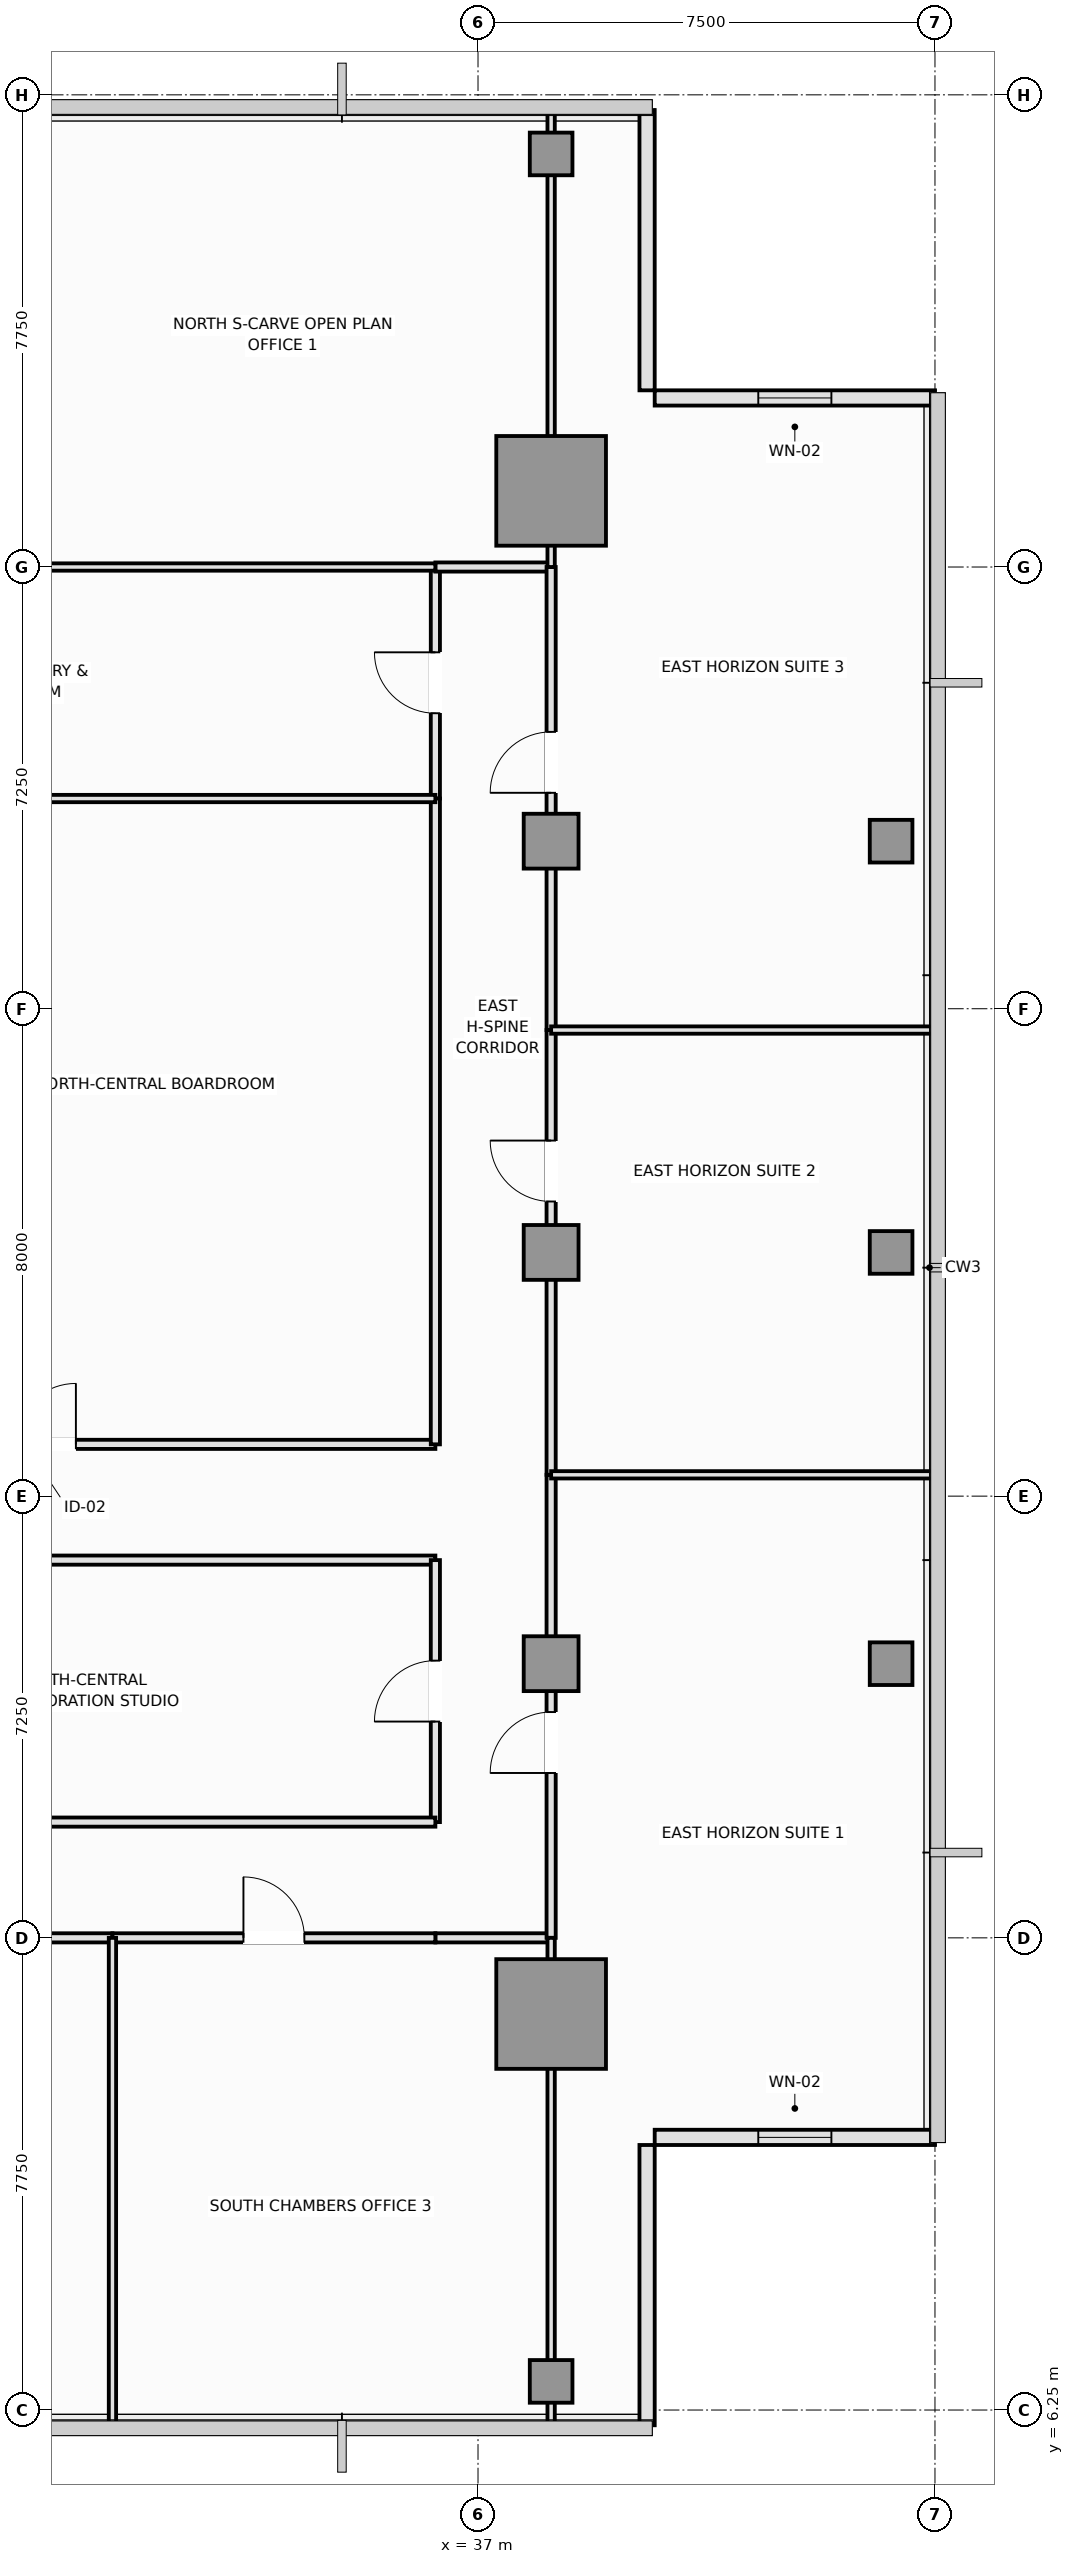
"""IFC4 building model, lengths in metres.
Left out: names, types, materials, properties, quantities, classifications, styles, units other than length and angle.
Written with IfcOpenShell. Run it as: python <this file> out.ifc"""

import sys

from ifc_helpers import new_model, si_unit, direction, frame, frame_2d, origin, origin_2d, place, context, subcontext, project, spatial, rectangle, extrude, element, fill, save


model = new_model("IFC4")
c1 = context("Model", 3, precision=1e-05, world=origin(), true_north=direction((0.0, 1.0)))
c2 = subcontext(c1, "Body", "Model", "MODEL_VIEW")
j1 = project(units=[si_unit("LENGTHUNIT", "METRE"), si_unit("PLANEANGLEUNIT", "RADIAN")], contexts=[c1])
p1 = place(None, origin())
s1 = spatial("IfcSite", under=j1, at=p1, CompositionType="ELEMENT")
p2 = place(p1, origin())
s2 = spatial("IfcBuilding", under=s1, at=p2, CompositionType="ELEMENT")
p3 = place(p2, frame((0.0, 0.0, 270.55)))
s3 = spatial("IfcBuildingStorey", under=s2, at=p3, CompositionType="ELEMENT", Elevation=270.55)
for number, where, z_axis, x_axis in (
    (1, (38.2, 12.75, 0.0), (0.0, 0.0, 1.0), (1.0, 0.0, 0.0)),
    (2, (38.2, 37.75, 0.0), (0.0, 0.0, 1.0), (1.0, 0.0, 0.0)),
):
    element("IfcColumn", number, at=place(p3, frame(where, z_axis=z_axis, x_axis=x_axis)), inside=s3, PredefinedType="COLUMN", context=c2, shape_type="SweptSolid", body=[
        extrude(rectangle(XDim=1.8, YDim=1.8, at=origin_2d()), origin(), (0.0, 0.0, 1.0), 3.55),
    ])
for number, where, z_axis, x_axis in (
    (3, (38.2, 18.5, 0.0), (0.0, 0.0, 1.0), (1.0, 0.0, 0.0)),
    (4, (38.2, 25.25, 0.0), (0.0, 0.0, 1.0), (1.0, 0.0, 0.0)),
    (5, (38.2, 32.0, 0.0), (0.0, 0.0, 1.0), (1.0, 0.0, 0.0)),
):
    element("IfcColumn", number, at=place(p3, frame(where, z_axis=z_axis, x_axis=x_axis)), inside=s3, PredefinedType="COLUMN", context=c2, shape_type="SweptSolid", body=[
        extrude(rectangle(XDim=0.9, YDim=0.9, at=origin_2d()), origin(), (0.0, 0.0, 1.0), 3.55),
    ])
for number, where, z_axis, x_axis in (
    (6, (43.78, 18.5, 0.0), (0.0, 0.0, 1.0), (1.0, 0.0, 0.0)),
    (7, (43.78, 25.25, 0.0), (0.0, 0.0, 1.0), (1.0, 0.0, 0.0)),
    (8, (43.78, 32.0, 0.0), (0.0, 0.0, 1.0), (1.0, 0.0, 0.0)),
    (9, (38.2, 6.72, 0.0), (0.0, 0.0, 1.0), (1.0, 0.0, 0.0)),
    (10, (38.2, 43.28, 0.0), (0.0, 0.0, 1.0), (1.0, 0.0, 0.0)),
):
    element("IfcColumn", number, at=place(p3, frame(where, z_axis=z_axis, x_axis=x_axis)), inside=s3, PredefinedType="COLUMN", context=c2, shape_type="SweptSolid", body=[
        extrude(rectangle(XDim=0.7, YDim=0.7, at=origin_2d()), origin(), (0.0, 0.0, 1.0), 3.55),
    ])
p4 = place(p3, frame((39.775, 6.0, 0.0), z_axis=(0.0, 0.0, 1.0), x_axis=(0.0, 1.0, 0.0)))
e11 = element("IfcWall", 11, at=p4, inside=s3, PredefinedType="SOLIDWALL", context=c2, shape_type="SweptSolid", body=[
    extrude(rectangle(XDim=4.6, YDim=0.25, at=frame_2d((2.3, 0.0))), origin(), (0.0, 0.0, 1.0), 3.39),
])
p5 = place(p3, frame((39.9, 10.725, 0.0), z_axis=(0.0, 0.0, 1.0), x_axis=(1.0, 0.0, 0.0)))
e12 = element("IfcWall", 12, at=p5, inside=s3, PredefinedType="SOLIDWALL", context=c2, shape_type="SweptSolid", body=[
    extrude(rectangle(XDim=4.6, YDim=0.25, at=frame_2d((2.3, 0.0))), origin(), (0.0, 0.0, 1.0), 3.39),
])
p6 = place(p5, frame((1.7, 0.0, 0.9)))
e13 = element("IfcOpeningElement", 13, at=p6, cuts=e12, PredefinedType="OPENING", context=c2, shape_type="SweptSolid", body=[
    extrude(rectangle(XDim=1.2, YDim=1.8, at=frame_2d((0.6, 0.9))), frame((0.0, 0.135, 0.0), z_axis=(0.0, -1.0, 0.0), x_axis=(1.0, 0.0, 0.0)), (0.0, 0.0, 1.0), 0.27),
])
p7 = place(p3, frame((44.5, 39.275, 0.0), z_axis=(0.0, 0.0, 1.0), x_axis=(-1.0, 0.0, 0.0)))
e14 = element("IfcWall", 14, at=p7, inside=s3, PredefinedType="SOLIDWALL", context=c2, shape_type="SweptSolid", body=[
    extrude(rectangle(XDim=4.6, YDim=0.25, at=frame_2d((2.3, 0.0))), origin(), (0.0, 0.0, 1.0), 3.39),
])
p8 = place(p7, frame((1.7, 0.0, 0.9)))
e15 = element("IfcOpeningElement", 15, at=p8, cuts=e14, PredefinedType="OPENING", context=c2, shape_type="SweptSolid", body=[
    extrude(rectangle(XDim=1.2, YDim=1.8, at=frame_2d((0.6, 0.9))), frame((0.0, 0.135, 0.0), z_axis=(0.0, -1.0, 0.0), x_axis=(1.0, 0.0, 0.0)), (0.0, 0.0, 1.0), 0.27),
])
p9 = place(p3, frame((39.775, 39.4, 0.0), z_axis=(0.0, 0.0, 1.0), x_axis=(0.0, 1.0, 0.0)))
e16 = element("IfcWall", 16, at=p9, inside=s3, PredefinedType="SOLIDWALL", context=c2, shape_type="SweptSolid", body=[
    extrude(rectangle(XDim=4.6, YDim=0.25, at=frame_2d((2.3, 0.0))), origin(), (0.0, 0.0, 1.0), 3.39),
])
p10 = place(p3, frame((26.13, 20.2, 0.0), z_axis=(0.0, 0.0, 1.0), x_axis=(1.0, 0.0, 0.0)))
e17 = element("IfcWall", 17, at=p10, inside=s3, PredefinedType="PARTITIONING", context=c2, shape_type="SweptSolid", body=[
    extrude(rectangle(XDim=10.17, YDim=0.15, at=frame_2d((5.085, 0.0))), origin(), (0.0, 0.0, 1.0), 3.39),
])
p11 = place(p3, frame((23.5, 22.1, 0.0), z_axis=(0.0, 0.0, 1.0), x_axis=(1.0, 0.0, 0.0)))
e18 = element("IfcWall", 18, at=p11, inside=s3, PredefinedType="PARTITIONING", context=c2, shape_type="SweptSolid", body=[
    extrude(rectangle(XDim=12.8, YDim=0.15, at=frame_2d((6.4, 0.0))), origin(), (0.0, 0.0, 1.0), 3.39),
])
p12 = place(p11, frame((5.9, 0.0, 0.0)))
e19 = element("IfcOpeningElement", 19, at=p12, cuts=e18, PredefinedType="OPENING", context=c2, shape_type="SweptSolid", body=[
    extrude(rectangle(XDim=1.0, YDim=2.15, at=frame_2d((0.5, 1.075))), frame((0.0, 0.085, 0.0), z_axis=(0.0, -1.0, 0.0), x_axis=(1.0, 0.0, 0.0)), (0.0, 0.0, 1.0), 0.17),
])
p13 = place(p3, frame((36.3, 15.9, 0.0), z_axis=(0.0, 0.0, 1.0), x_axis=(0.0, 1.0, 0.0)))
e20 = element("IfcWall", 20, at=p13, inside=s3, PredefinedType="PARTITIONING", context=c2, shape_type="SweptSolid", body=[
    extrude(rectangle(XDim=4.3, YDim=0.15, at=frame_2d((2.15, 0.0))), origin(), (0.0, 0.0, 1.0), 3.39),
])
p14 = place(p13, frame((1.65, 0.0, 0.0)))
e21 = element("IfcOpeningElement", 21, at=p14, cuts=e20, PredefinedType="OPENING", context=c2, shape_type="SweptSolid", body=[
    extrude(rectangle(XDim=1.0, YDim=2.15, at=frame_2d((0.5, 1.075))), frame((0.0, 0.085, 0.0), z_axis=(0.0, -1.0, 0.0), x_axis=(1.0, 0.0, 0.0)), (0.0, 0.0, 1.0), 0.17),
])
p15 = place(p3, frame((36.3, 32.7, 0.0), z_axis=(0.0, 0.0, 1.0), x_axis=(0.0, 1.0, 0.0)))
e22 = element("IfcWall", 22, at=p15, inside=s3, PredefinedType="PARTITIONING", context=c2, shape_type="SweptSolid", body=[
    extrude(rectangle(XDim=3.8, YDim=0.15, at=frame_2d((1.9, 0.0))), origin(), (0.0, 0.0, 1.0), 3.39),
])
p16 = place(p15, frame((1.4, 0.0, 0.0)))
e23 = element("IfcOpeningElement", 23, at=p16, cuts=e22, PredefinedType="OPENING", context=c2, shape_type="SweptSolid", body=[
    extrude(rectangle(XDim=1.0, YDim=2.15, at=frame_2d((0.5, 1.075))), frame((0.0, 0.085, 0.0), z_axis=(0.0, -1.0, 0.0), x_axis=(1.0, 0.0, 0.0)), (0.0, 0.0, 1.0), 0.17),
])
p17 = place(p3, frame((36.3, 22.1, 0.0), z_axis=(0.0, 0.0, 1.0), x_axis=(0.0, 1.0, 0.0)))
e24 = element("IfcWall", 24, at=p17, inside=s3, PredefinedType="PARTITIONING", context=c2, shape_type="SweptSolid", body=[
    extrude(rectangle(XDim=10.6, YDim=0.15, at=frame_2d((5.3, 0.0))), origin(), (0.0, 0.0, 1.0), 3.39),
])
for number, where, z_axis, x_axis in (
    (25, (36.3, 14.0, 0.0), (0.0, 0.0, 1.0), (1.0, 0.0, 0.0)),
    (26, (36.3, 36.5, 0.0), (0.0, 0.0, 1.0), (1.0, 0.0, 0.0)),
):
    element("IfcWall", number, at=place(p3, frame(where, z_axis=z_axis, x_axis=x_axis)), inside=s3, PredefinedType="PARTITIONING", context=c2, shape_type="SweptSolid", body=[
        extrude(rectangle(XDim=1.9, YDim=0.15, at=frame_2d((0.95, 0.0))), origin(), (0.0, 0.0, 1.0), 3.39),
    ])
p18 = place(p3, frame((38.2, 14.0, 0.0), z_axis=(0.0, 0.0, 1.0), x_axis=(0.0, 1.0, 0.0)))
e27 = element("IfcWall", 27, at=p18, inside=s3, PredefinedType="PARTITIONING", context=c2, shape_type="SweptSolid", body=[
    extrude(rectangle(XDim=7.6, YDim=0.15, at=frame_2d((3.8, 0.0))), origin(), (0.0, 0.0, 1.0), 2.99),
])
p19 = place(p18, frame((2.706, 0.0, 0.0)))
e28 = element("IfcOpeningElement", 28, at=p19, cuts=e27, PredefinedType="OPENING", context=c2, shape_type="SweptSolid", body=[
    extrude(rectangle(XDim=1.0, YDim=2.15, at=frame_2d((0.5, 1.075))), frame((0.0, 0.085, 0.0), z_axis=(0.0, -1.0, 0.0), x_axis=(1.0, 0.0, 0.0)), (0.0, 0.0, 1.0), 0.17),
])
p20 = place(p3, frame((38.2, 21.6, 0.0), z_axis=(0.0, 0.0, 1.0), x_axis=(0.0, 1.0, 0.0)))
e29 = element("IfcWall", 29, at=p20, inside=s3, PredefinedType="PARTITIONING", context=c2, shape_type="SweptSolid", body=[
    extrude(rectangle(XDim=7.3, YDim=0.15, at=frame_2d((3.65, 0.0))), origin(), (0.0, 0.0, 1.0), 2.99),
])
p21 = place(p20, frame((4.486, 0.0, 0.0)))
e30 = element("IfcOpeningElement", 30, at=p21, cuts=e29, PredefinedType="OPENING", context=c2, shape_type="SweptSolid", body=[
    extrude(rectangle(XDim=1.0, YDim=2.15, at=frame_2d((0.5, 1.075))), frame((0.0, 0.085, 0.0), z_axis=(0.0, -1.0, 0.0), x_axis=(1.0, 0.0, 0.0)), (0.0, 0.0, 1.0), 0.17),
])
p22 = place(p3, frame((38.2, 28.9, 0.0), z_axis=(0.0, 0.0, 1.0), x_axis=(0.0, 1.0, 0.0)))
e31 = element("IfcWall", 31, at=p22, inside=s3, PredefinedType="PARTITIONING", context=c2, shape_type="SweptSolid", body=[
    extrude(rectangle(XDim=7.6, YDim=0.15, at=frame_2d((3.8, 0.0))), origin(), (0.0, 0.0, 1.0), 2.99),
])
p23 = place(p22, frame((3.894, 0.0, 0.0)))
e32 = element("IfcOpeningElement", 32, at=p23, cuts=e31, PredefinedType="OPENING", context=c2, shape_type="SweptSolid", body=[
    extrude(rectangle(XDim=1.0, YDim=2.15, at=frame_2d((0.5, 1.075))), frame((0.0, 0.085, 0.0), z_axis=(0.0, -1.0, 0.0), x_axis=(1.0, 0.0, 0.0)), (0.0, 0.0, 1.0), 0.17),
])
p24 = place(p3, frame((26.13, 15.9, 0.0), z_axis=(0.0, 0.0, 1.0), x_axis=(1.0, 0.0, 0.0)))
e33 = element("IfcWall", 33, at=p24, inside=s3, PredefinedType="PARTITIONING", context=c2, shape_type="SweptSolid", body=[
    extrude(rectangle(XDim=10.17, YDim=0.15, at=frame_2d((5.085, 0.0))), origin(), (0.0, 0.0, 1.0), 3.39),
])
p25 = place(p3, frame((27.5, 14.0, 0.0), z_axis=(0.0, 0.0, 1.0), x_axis=(1.0, 0.0, 0.0)))
e34 = element("IfcWall", 34, at=p25, inside=s3, PredefinedType="PARTITIONING", context=c2, shape_type="SweptSolid", body=[
    extrude(rectangle(XDim=3.5, YDim=0.15, at=frame_2d((1.75, 0.0))), origin(), (0.0, 0.0, 1.0), 3.39),
])
p26 = place(p25, frame((1.25, 0.0, 0.0)))
e35 = element("IfcOpeningElement", 35, at=p26, cuts=e34, PredefinedType="OPENING", context=c2, shape_type="SweptSolid", body=[
    extrude(rectangle(XDim=1.0, YDim=2.15, at=frame_2d((0.5, 1.075))), frame((0.0, 0.085, 0.0), z_axis=(0.0, -1.0, 0.0), x_axis=(1.0, 0.0, 0.0)), (0.0, 0.0, 1.0), 0.17),
])
p27 = place(p3, frame((31.0, 14.0, 0.0), z_axis=(0.0, 0.0, 1.0), x_axis=(1.0, 0.0, 0.0)))
e36 = element("IfcWall", 36, at=p27, inside=s3, PredefinedType="PARTITIONING", context=c2, shape_type="SweptSolid", body=[
    extrude(rectangle(XDim=5.3, YDim=0.15, at=frame_2d((2.65, 0.0))), origin(), (0.0, 0.0, 1.0), 3.39),
])
p28 = place(p27, frame((2.15, 0.0, 0.0)))
e37 = element("IfcOpeningElement", 37, at=p28, cuts=e36, PredefinedType="OPENING", context=c2, shape_type="SweptSolid", body=[
    extrude(rectangle(XDim=1.0, YDim=2.15, at=frame_2d((0.5, 1.075))), frame((0.0, 0.085, 0.0), z_axis=(0.0, -1.0, 0.0), x_axis=(1.0, 0.0, 0.0)), (0.0, 0.0, 1.0), 0.17),
])
for number, where, z_axis, x_axis in (
    (38, (23.5, 32.7, 0.0), (0.0, 0.0, 1.0), (1.0, 0.0, 0.0)),
    (39, (23.5, 36.5, 0.0), (0.0, 0.0, 1.0), (1.0, 0.0, 0.0)),
):
    element("IfcWall", number, at=place(p3, frame(where, z_axis=z_axis, x_axis=x_axis)), inside=s3, PredefinedType="PARTITIONING", context=c2, shape_type="SweptSolid", body=[
        extrude(rectangle(XDim=12.8, YDim=0.12, at=frame_2d((6.4, 0.0))), origin(), (0.0, 0.0, 1.0), 3.39),
    ])
p29 = place(p3, frame((31.0, 6.01, 0.0), z_axis=(0.0, 0.0, 1.0), x_axis=(0.0, 1.0, 0.0)))
e40 = element("IfcWall", 40, at=p29, inside=s3, PredefinedType="PARTITIONING", context=c2, shape_type="SweptSolid", body=[
    extrude(rectangle(XDim=7.99, YDim=0.12, at=frame_2d((3.995, 0.0))), origin(), (0.0, 0.0, 1.0), 3.39),
])
p30 = place(p3, frame((38.2, 6.01, 0.0), z_axis=(0.0, 0.0, 1.0), x_axis=(0.0, 1.0, 0.0)))
e41 = element("IfcWall", 41, at=p30, inside=s3, PredefinedType="PARTITIONING", context=c2, shape_type="SweptSolid", body=[
    extrude(rectangle(XDim=7.99, YDim=0.12, at=frame_2d((3.995, 0.0))), origin(), (0.0, 0.0, 1.0), 2.99),
])
p31 = place(p3, frame((38.2, 36.5, 0.0), z_axis=(0.0, 0.0, 1.0), x_axis=(0.0, 1.0, 0.0)))
e42 = element("IfcWall", 42, at=p31, inside=s3, PredefinedType="PARTITIONING", context=c2, shape_type="SweptSolid", body=[
    extrude(rectangle(XDim=7.49, YDim=0.12, at=frame_2d((3.745, 0.0))), origin(), (0.0, 0.0, 1.0), 2.99),
])
for number, where, z_axis, x_axis in (
    (43, (38.2, 21.6, 0.0), (0.0, 0.0, 1.0), (1.0, 0.0, 0.0)),
    (44, (38.2, 28.9, 0.0), (0.0, 0.0, 1.0), (1.0, 0.0, 0.0)),
):
    element("IfcWall", number, at=place(p3, frame(where, z_axis=z_axis, x_axis=x_axis)), inside=s3, PredefinedType="PARTITIONING", context=c2, shape_type="SweptSolid", body=[
        extrude(rectangle(XDim=6.29, YDim=0.12, at=frame_2d((3.145, 0.0))), origin(), (0.0, 0.0, 1.0), 3.39),
    ])
p32 = place(p6, origin())
e45 = element("IfcWindow", 45, at=p32, inside=s3, PartitioningType="SINGLE_PANEL", PredefinedType="WINDOW", context=c2, shape_type="SweptSolid", body=[
    extrude(rectangle(XDim=1.2, YDim=1.8, at=frame_2d((0.6, 0.9))), frame((0.0, 0.03, 0.0), z_axis=(0.0, -1.0, 0.0), x_axis=(1.0, 0.0, 0.0)), (0.0, 0.0, 1.0), 0.06),
])
fill(e13, e45)
p33 = place(p8, origin())
e46 = element("IfcWindow", 46, at=p33, inside=s3, PartitioningType="SINGLE_PANEL", PredefinedType="WINDOW", context=c2, shape_type="SweptSolid", body=[
    extrude(rectangle(XDim=1.2, YDim=1.8, at=frame_2d((0.6, 0.9))), frame((0.0, 0.03, 0.0), z_axis=(0.0, -1.0, 0.0), x_axis=(1.0, 0.0, 0.0)), (0.0, 0.0, 1.0), 0.06),
])
fill(e15, e46)
p34 = place(p12, origin())
e47 = element("IfcDoor", 47, at=p34, inside=s3, OperationType="SINGLE_SWING_RIGHT", PredefinedType="DOOR", context=c2, shape_type="SweptSolid", body=[
    extrude(rectangle(XDim=1.0, YDim=2.15, at=frame_2d((0.5, 1.075))), frame((0.0, 0.025, 0.0), z_axis=(0.0, -1.0, 0.0), x_axis=(1.0, 0.0, 0.0)), (0.0, 0.0, 1.0), 0.05),
])
fill(e19, e47)
p35 = place(p14, origin())
e48 = element("IfcDoor", 48, at=p35, inside=s3, OperationType="SINGLE_SWING_LEFT", PredefinedType="DOOR", context=c2, shape_type="SweptSolid", body=[
    extrude(rectangle(XDim=1.0, YDim=2.15, at=frame_2d((0.5, 1.075))), frame((0.0, 0.025, 0.0), z_axis=(0.0, -1.0, 0.0), x_axis=(1.0, 0.0, 0.0)), (0.0, 0.0, 1.0), 0.05),
])
fill(e21, e48)
p36 = place(p16, origin())
e49 = element("IfcDoor", 49, at=p36, inside=s3, OperationType="SINGLE_SWING_RIGHT", PredefinedType="DOOR", context=c2, shape_type="SweptSolid", body=[
    extrude(rectangle(XDim=1.0, YDim=2.15, at=frame_2d((0.5, 1.075))), frame((0.0, 0.025, 0.0), z_axis=(0.0, -1.0, 0.0), x_axis=(1.0, 0.0, 0.0)), (0.0, 0.0, 1.0), 0.05),
])
fill(e23, e49)
p37 = place(p19, origin())
e50 = element("IfcDoor", 50, at=p37, inside=s3, OperationType="SINGLE_SWING_LEFT", PredefinedType="DOOR", context=c2, shape_type="SweptSolid", body=[
    extrude(rectangle(XDim=1.0, YDim=2.15, at=frame_2d((0.5, 1.075))), frame((0.0, 0.025, 0.0), z_axis=(0.0, -1.0, 0.0), x_axis=(1.0, 0.0, 0.0)), (0.0, 0.0, 1.0), 0.05),
])
fill(e28, e50)
p38 = place(p21, origin())
e51 = element("IfcDoor", 51, at=p38, inside=s3, OperationType="SINGLE_SWING_RIGHT", PredefinedType="DOOR", context=c2, shape_type="SweptSolid", body=[
    extrude(rectangle(XDim=1.0, YDim=2.15, at=frame_2d((0.5, 1.075))), frame((0.0, 0.025, 0.0), z_axis=(0.0, -1.0, 0.0), x_axis=(1.0, 0.0, 0.0)), (0.0, 0.0, 1.0), 0.05),
])
fill(e30, e51)
p39 = place(p23, origin())
e52 = element("IfcDoor", 52, at=p39, inside=s3, OperationType="SINGLE_SWING_LEFT", PredefinedType="DOOR", context=c2, shape_type="SweptSolid", body=[
    extrude(rectangle(XDim=1.0, YDim=2.15, at=frame_2d((0.5, 1.075))), frame((0.0, 0.025, 0.0), z_axis=(0.0, -1.0, 0.0), x_axis=(1.0, 0.0, 0.0)), (0.0, 0.0, 1.0), 0.05),
])
fill(e32, e52)
p40 = place(p28, origin())
e53 = element("IfcDoor", 53, at=p40, inside=s3, OperationType="SINGLE_SWING_LEFT", PredefinedType="DOOR", context=c2, shape_type="SweptSolid", body=[
    extrude(rectangle(XDim=1.0, YDim=2.15, at=frame_2d((0.5, 1.075))), frame((0.0, 0.025, 0.0), z_axis=(0.0, -1.0, 0.0), x_axis=(1.0, 0.0, 0.0)), (0.0, 0.0, 1.0), 0.05),
])
fill(e37, e53)
save(model, sys.argv[1])
